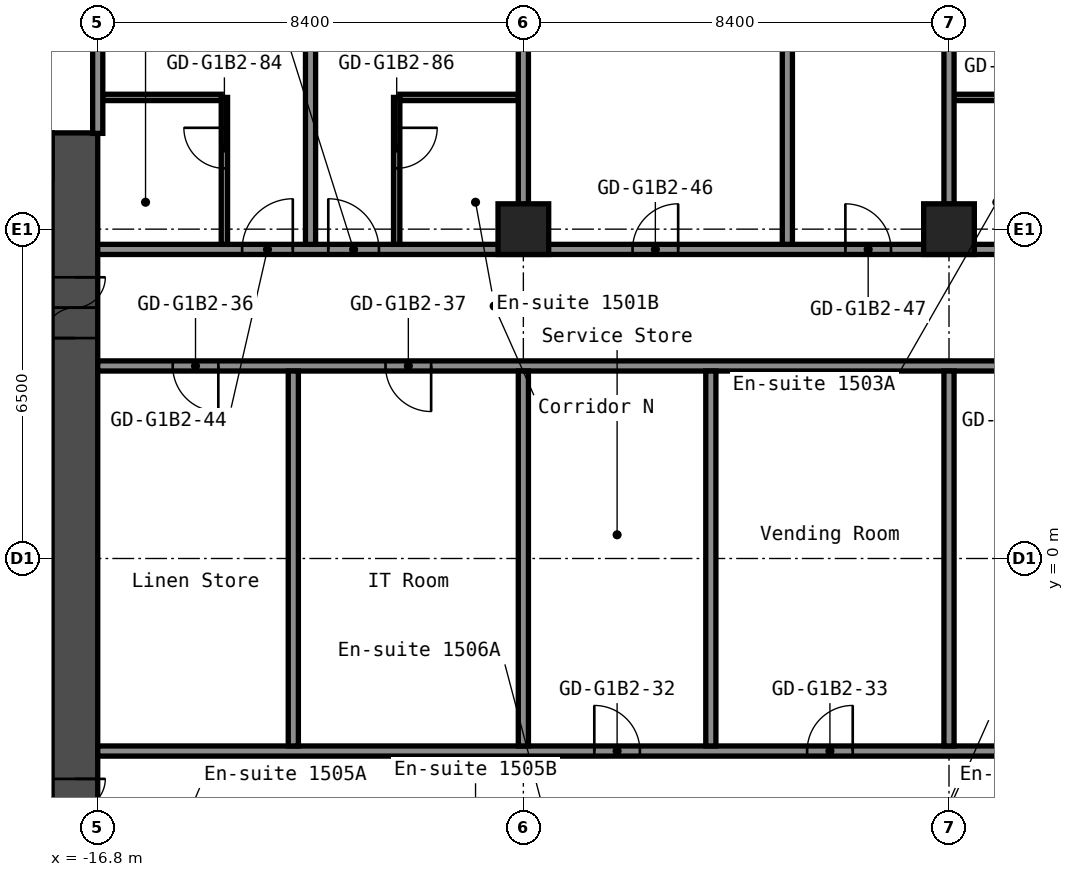
"""IFC4 building model, lengths in metres.
Left out: names, types, materials, properties, quantities, classifications, styles, units other than length and angle.
Written with IfcOpenShell. Run it as: python <this file> out.ifc"""

import sys

from ifc_helpers import new_model, si_unit, direction, frame, frame_2d, origin, origin_2d, place, context, subcontext, project, spatial, rectangle, hollow_rectangle, extrude, element, fill, save


model = new_model("IFC4")
c1 = context("Model", 3, precision=1e-05, world=origin(), true_north=direction((0.0, 1.0)))
c2 = subcontext(c1, "Body", "Model", "MODEL_VIEW")
j1 = project(units=[si_unit("LENGTHUNIT", "METRE"), si_unit("PLANEANGLEUNIT", "RADIAN")], contexts=[c1])
p1 = place(None, origin())
s1 = spatial("IfcSite", under=j1, at=p1, CompositionType="ELEMENT")
p2 = place(p1, origin())
s2 = spatial("IfcBuilding", under=s1, at=p2, CompositionType="ELEMENT")
p3 = place(p2, frame((0.0, 0.0, 55.0)))
s3 = spatial("IfcBuildingStorey", under=s2, at=p3, CompositionType="ELEMENT", Elevation=55.0)
for number, where, z_axis, x_axis in (
    (1, (-8.4, 6.5, 0.0), (0.0, 0.0, 1.0), (1.0, 0.0, 0.0)),
    (2, (0.0, 6.5, 0.0), (0.0, 0.0, 1.0), (1.0, 0.0, 0.0)),
):
    element("IfcColumn", number, at=place(p3, frame(where, z_axis=z_axis, x_axis=x_axis)), inside=s3, PredefinedType="COLUMN", context=c2, shape_type="SweptSolid", body=[
        extrude(hollow_rectangle(XDim=1.0, YDim=1.0, WallThickness=0.04, at=origin_2d()), origin(), (0.0, 0.0, 1.0), 2.8),
    ])
p4 = place(p3, frame((-17.25, -8.4, 0.0), z_axis=(0.0, 0.0, 1.0), x_axis=(0.0, 1.0, 0.0)))
e3 = element("IfcWall", 3, at=p4, inside=s3, PredefinedType="SHEAR", context=c2, shape_type="SweptSolid", body=[
    extrude(rectangle(XDim=16.8, YDim=0.9, at=frame_2d((8.4, 0.0))), origin(), (0.0, 0.0, 1.0), 2.8),
])
p5 = place(p4, frame((12.75, 0.0, 0.0)))
e4 = element("IfcOpeningElement", 4, at=p5, cuts=e3, PredefinedType="OPENING", context=c2, shape_type="SweptSolid", body=[
    extrude(rectangle(XDim=1.2, YDim=2.1, at=frame_2d((0.6, 1.05))), frame((0.0, 0.46, 0.0), z_axis=(0.0, -1.0, 0.0), x_axis=(1.0, 0.0, 0.0)), (0.0, 0.0, 1.0), 0.92),
])
p6 = place(p4, frame((2.85, 0.0, 0.0)))
e5 = element("IfcOpeningElement", 5, at=p6, cuts=e3, PredefinedType="OPENING", context=c2, shape_type="SweptSolid", body=[
    extrude(rectangle(XDim=1.2, YDim=2.1, at=frame_2d((0.6, 1.05))), frame((0.0, 0.46, 0.0), z_axis=(0.0, -1.0, 0.0), x_axis=(1.0, 0.0, 0.0)), (0.0, 0.0, 1.0), 0.92),
])
p7 = place(p3, frame((-32.7, 7.95, 0.0), z_axis=(0.0, 0.0, 1.0), x_axis=(1.0, 0.0, 0.0)))
e6 = element("IfcWall", 6, at=p7, inside=s3, PredefinedType="SHEAR", context=c2, shape_type="SweptSolid", body=[
    extrude(rectangle(XDim=15.0, YDim=0.9, at=frame_2d((7.5, 0.0))), origin(), (0.0, 0.0, 1.0), 2.8),
])
p8 = place(p7, frame((3.4, 0.0, 0.0)))
e7 = element("IfcOpeningElement", 7, at=p8, cuts=e6, PredefinedType="OPENING", context=c2, shape_type="SweptSolid", body=[
    extrude(rectangle(XDim=1.2, YDim=2.1, at=frame_2d((0.6, 1.05))), frame((0.0, 0.46, 0.0), z_axis=(0.0, -1.0, 0.0), x_axis=(1.0, 0.0, 0.0)), (0.0, 0.0, 1.0), 0.92),
])
p9 = place(p7, frame((0.75, 0.0, 0.0)))
e8 = element("IfcOpeningElement", 8, at=p9, cuts=e6, PredefinedType="OPENING", context=c2, shape_type="SweptSolid", body=[
    extrude(rectangle(XDim=0.9, YDim=2.1, at=frame_2d((0.45, 1.05))), frame((0.0, 0.46, 0.0), z_axis=(0.0, -1.0, 0.0), x_axis=(1.0, 0.0, 0.0)), (0.0, 0.0, 1.0), 0.92),
])
p10 = place(p3, frame((-16.8, -3.8, 0.0), z_axis=(0.0, 0.0, 1.0), x_axis=(1.0, 0.0, 0.0)))
e9 = element("IfcWall", 9, at=p10, inside=s3, PredefinedType="PARTITIONING", context=c2, shape_type="SweptSolid", body=[
    extrude(rectangle(XDim=33.6, YDim=0.2, at=frame_2d((16.8, 0.0))), origin(), (0.0, 0.0, 1.0), 2.8),
])
p11 = place(p10, frame((9.8, 0.0, 0.0)))
e10 = element("IfcOpeningElement", 10, at=p11, cuts=e9, PredefinedType="OPENING", context=c2, shape_type="SweptSolid", body=[
    extrude(rectangle(XDim=0.9, YDim=2.1, at=frame_2d((0.45, 1.05))), frame((0.0, 0.11, 0.0), z_axis=(0.0, -1.0, 0.0), x_axis=(1.0, 0.0, 0.0)), (0.0, 0.0, 1.0), 0.22),
])
p12 = place(p10, frame((14.0, 0.0, 0.0)))
e11 = element("IfcOpeningElement", 11, at=p12, cuts=e9, PredefinedType="OPENING", context=c2, shape_type="SweptSolid", body=[
    extrude(rectangle(XDim=0.9, YDim=2.1, at=frame_2d((0.45, 1.05))), frame((0.0, 0.11, 0.0), z_axis=(0.0, -1.0, 0.0), x_axis=(1.0, 0.0, 0.0)), (0.0, 0.0, 1.0), 0.22),
])
p13 = place(p10, frame((26.43, 0.0, 0.0)))
e12 = element("IfcOpeningElement", 12, at=p13, cuts=e9, PredefinedType="OPENING", context=c2, shape_type="SweptSolid", body=[
    extrude(rectangle(XDim=0.9, YDim=2.1, at=frame_2d((0.45, 1.05))), frame((0.0, 0.11, 0.0), z_axis=(0.0, -1.0, 0.0), x_axis=(1.0, 0.0, 0.0)), (0.0, 0.0, 1.0), 0.22),
])
p14 = place(p10, frame((30.63, 0.0, 0.0)))
e13 = element("IfcOpeningElement", 13, at=p14, cuts=e9, PredefinedType="OPENING", context=c2, shape_type="SweptSolid", body=[
    extrude(rectangle(XDim=0.9, YDim=2.1, at=frame_2d((0.45, 1.05))), frame((0.0, 0.11, 0.0), z_axis=(0.0, -1.0, 0.0), x_axis=(1.0, 0.0, 0.0)), (0.0, 0.0, 1.0), 0.22),
])
p15 = place(p3, frame((-16.8, 3.8, 0.0), z_axis=(0.0, 0.0, 1.0), x_axis=(1.0, 0.0, 0.0)))
e14 = element("IfcWall", 14, at=p15, inside=s3, PredefinedType="PARTITIONING", context=c2, shape_type="SweptSolid", body=[
    extrude(rectangle(XDim=33.6, YDim=0.2, at=frame_2d((16.8, 0.0))), origin(), (0.0, 0.0, 1.0), 2.8),
])
p16 = place(p15, frame((1.48, 0.0, 0.0)))
e15 = element("IfcOpeningElement", 15, at=p16, cuts=e14, PredefinedType="OPENING", context=c2, shape_type="SweptSolid", body=[
    extrude(rectangle(XDim=0.9, YDim=2.1, at=frame_2d((0.45, 1.05))), frame((0.0, 0.11, 0.0), z_axis=(0.0, -1.0, 0.0), x_axis=(1.0, 0.0, 0.0)), (0.0, 0.0, 1.0), 0.22),
])
p17 = place(p15, frame((5.68, 0.0, 0.0)))
e16 = element("IfcOpeningElement", 16, at=p17, cuts=e14, PredefinedType="OPENING", context=c2, shape_type="SweptSolid", body=[
    extrude(rectangle(XDim=0.9, YDim=2.1, at=frame_2d((0.45, 1.05))), frame((0.0, 0.11, 0.0), z_axis=(0.0, -1.0, 0.0), x_axis=(1.0, 0.0, 0.0)), (0.0, 0.0, 1.0), 0.22),
])
p18 = place(p15, frame((18.785, 0.0, 0.0)))
e17 = element("IfcOpeningElement", 17, at=p18, cuts=e14, PredefinedType="OPENING", context=c2, shape_type="SweptSolid", body=[
    extrude(rectangle(XDim=0.9, YDim=2.1, at=frame_2d((0.45, 1.05))), frame((0.0, 0.11, 0.0), z_axis=(0.0, -1.0, 0.0), x_axis=(1.0, 0.0, 0.0)), (0.0, 0.0, 1.0), 0.22),
])
p19 = place(p15, frame((22.985, 0.0, 0.0)))
e18 = element("IfcOpeningElement", 18, at=p19, cuts=e14, PredefinedType="OPENING", context=c2, shape_type="SweptSolid", body=[
    extrude(rectangle(XDim=0.9, YDim=2.1, at=frame_2d((0.45, 1.05))), frame((0.0, 0.11, 0.0), z_axis=(0.0, -1.0, 0.0), x_axis=(1.0, 0.0, 0.0)), (0.0, 0.0, 1.0), 0.22),
])
p20 = place(p3, frame((-16.8, 6.1, 0.0), z_axis=(0.0, 0.0, 1.0), x_axis=(1.0, 0.0, 0.0)))
e19 = element("IfcWall", 19, at=p20, inside=s3, PredefinedType="PARTITIONING", context=c2, shape_type="SweptSolid", body=[
    extrude(rectangle(XDim=33.6, YDim=0.2, at=frame_2d((16.8, 0.0))), origin(), (0.0, 0.0, 1.0), 2.8),
])
p21 = place(p20, frame((2.85, 0.0, 0.0)))
e20 = element("IfcOpeningElement", 20, at=p21, cuts=e19, PredefinedType="OPENING", context=c2, shape_type="SweptSolid", body=[
    extrude(rectangle(XDim=1.0, YDim=2.1, at=frame_2d((0.5, 1.05))), frame((0.0, 0.11, 0.0), z_axis=(0.0, -1.0, 0.0), x_axis=(1.0, 0.0, 0.0)), (0.0, 0.0, 1.0), 0.22),
])
p22 = place(p20, frame((4.55, 0.0, 0.0)))
e21 = element("IfcOpeningElement", 21, at=p22, cuts=e19, PredefinedType="OPENING", context=c2, shape_type="SweptSolid", body=[
    extrude(rectangle(XDim=1.0, YDim=2.1, at=frame_2d((0.5, 1.05))), frame((0.0, 0.11, 0.0), z_axis=(0.0, -1.0, 0.0), x_axis=(1.0, 0.0, 0.0)), (0.0, 0.0, 1.0), 0.22),
])
p23 = place(p20, frame((10.555, 0.0, 0.0)))
e22 = element("IfcOpeningElement", 22, at=p23, cuts=e19, PredefinedType="OPENING", context=c2, shape_type="SweptSolid", body=[
    extrude(rectangle(XDim=0.9, YDim=2.1, at=frame_2d((0.45, 1.05))), frame((0.0, 0.11, 0.0), z_axis=(0.0, -1.0, 0.0), x_axis=(1.0, 0.0, 0.0)), (0.0, 0.0, 1.0), 0.22),
])
p24 = place(p20, frame((14.755, 0.0, 0.0)))
e23 = element("IfcOpeningElement", 23, at=p24, cuts=e19, PredefinedType="OPENING", context=c2, shape_type="SweptSolid", body=[
    extrude(rectangle(XDim=0.9, YDim=2.1, at=frame_2d((0.45, 1.05))), frame((0.0, 0.11, 0.0), z_axis=(0.0, -1.0, 0.0), x_axis=(1.0, 0.0, 0.0)), (0.0, 0.0, 1.0), 0.22),
])
p25 = place(p20, frame((19.65, 0.0, 0.0)))
e24 = element("IfcOpeningElement", 24, at=p25, cuts=e19, PredefinedType="OPENING", context=c2, shape_type="SweptSolid", body=[
    extrude(rectangle(XDim=1.0, YDim=2.1, at=frame_2d((0.5, 1.05))), frame((0.0, 0.11, 0.0), z_axis=(0.0, -1.0, 0.0), x_axis=(1.0, 0.0, 0.0)), (0.0, 0.0, 1.0), 0.22),
])
p26 = place(p20, frame((21.35, 0.0, 0.0)))
e25 = element("IfcOpeningElement", 25, at=p26, cuts=e19, PredefinedType="OPENING", context=c2, shape_type="SweptSolid", body=[
    extrude(rectangle(XDim=1.0, YDim=2.1, at=frame_2d((0.5, 1.05))), frame((0.0, 0.11, 0.0), z_axis=(0.0, -1.0, 0.0), x_axis=(1.0, 0.0, 0.0)), (0.0, 0.0, 1.0), 0.22),
])
p27 = place(p20, frame((28.05, 0.0, 0.0)))
e26 = element("IfcOpeningElement", 26, at=p27, cuts=e19, PredefinedType="OPENING", context=c2, shape_type="SweptSolid", body=[
    extrude(rectangle(XDim=1.0, YDim=2.1, at=frame_2d((0.5, 1.05))), frame((0.0, 0.11, 0.0), z_axis=(0.0, -1.0, 0.0), x_axis=(1.0, 0.0, 0.0)), (0.0, 0.0, 1.0), 0.22),
])
p28 = place(p20, frame((29.75, 0.0, 0.0)))
e27 = element("IfcOpeningElement", 27, at=p28, cuts=e19, PredefinedType="OPENING", context=c2, shape_type="SweptSolid", body=[
    extrude(rectangle(XDim=1.0, YDim=2.1, at=frame_2d((0.5, 1.05))), frame((0.0, 0.11, 0.0), z_axis=(0.0, -1.0, 0.0), x_axis=(1.0, 0.0, 0.0)), (0.0, 0.0, 1.0), 0.22),
])
for number, where, z_axis, x_axis in (
    (28, (-16.7, 9.1, 0.0), (0.0, 0.0, 1.0), (1.0, 0.0, 0.0)),
    (29, (-10.837, 9.1, 0.0), (0.0, 0.0, 1.0), (1.0, 0.0, 0.0)),
    (30, (0.1, 9.1, 0.0), (0.0, 0.0, 1.0), (1.0, 0.0, 0.0)),
):
    element("IfcWall", number, at=place(p3, frame(where, z_axis=z_axis, x_axis=x_axis)), inside=s3, PredefinedType="PARTITIONING", context=c2, shape_type="SweptSolid", body=[
        extrude(rectangle(XDim=2.337, YDim=0.125, at=frame_2d((1.169, 0.0))), origin(), (0.0, 0.0, 1.0), 2.8),
    ])
p29 = place(p3, frame((-16.8, 8.39, 0.0), z_axis=(0.0, 0.0, 1.0), x_axis=(0.0, 1.0, 0.0)))
e31 = element("IfcWall", 31, at=p29, inside=s3, PredefinedType="PARTITIONING", context=c2, shape_type="SweptSolid", body=[
    extrude(rectangle(XDim=11.91, YDim=0.2, at=frame_2d((5.955, 0.0))), origin(), (0.0, 0.0, 1.0), 2.8),
])
p30 = place(p3, frame((-14.3, 6.2, 0.0), z_axis=(0.0, 0.0, 1.0), x_axis=(0.0, 1.0, 0.0)))
e32 = element("IfcWall", 32, at=p30, inside=s3, PredefinedType="PARTITIONING", context=c2, shape_type="SweptSolid", body=[
    extrude(rectangle(XDim=2.9, YDim=0.125, at=frame_2d((1.45, 0.0))), origin(), (0.0, 0.0, 1.0), 2.8),
])
p31 = place(p30, frame((1.5, 0.0, 0.0)))
e33 = element("IfcOpeningElement", 33, at=p31, cuts=e32, PredefinedType="OPENING", context=c2, shape_type="SweptSolid", body=[
    extrude(rectangle(XDim=0.8, YDim=2.1, at=frame_2d((0.4, 1.05))), frame((0.0, 0.073, 0.0), z_axis=(0.0, -1.0, 0.0), x_axis=(1.0, 0.0, 0.0)), (0.0, 0.0, 1.0), 0.145),
])
p32 = place(p3, frame((-12.94, -3.7, 0.0), z_axis=(0.0, 0.0, 1.0), x_axis=(0.0, 1.0, 0.0)))
e34 = element("IfcWall", 34, at=p32, inside=s3, PredefinedType="PARTITIONING", context=c2, shape_type="SweptSolid", body=[
    extrude(rectangle(XDim=7.4, YDim=0.2, at=frame_2d((3.7, 0.0))), origin(), (0.0, 0.0, 1.0), 2.8),
])
p33 = place(p3, frame((-12.6, 6.2, 0.0), z_axis=(0.0, 0.0, 1.0), x_axis=(0.0, 1.0, 0.0)))
e35 = element("IfcWall", 35, at=p33, inside=s3, PredefinedType="PARTITIONING", context=c2, shape_type="SweptSolid", body=[
    extrude(rectangle(XDim=14.1, YDim=0.2, at=frame_2d((7.05, 0.0))), origin(), (0.0, 0.0, 1.0), 2.8),
])
p34 = place(p3, frame((-10.9, 6.2, 0.0), z_axis=(0.0, 0.0, 1.0), x_axis=(0.0, 1.0, 0.0)))
e36 = element("IfcWall", 36, at=p34, inside=s3, PredefinedType="PARTITIONING", context=c2, shape_type="SweptSolid", body=[
    extrude(rectangle(XDim=2.9, YDim=0.125, at=frame_2d((1.45, 0.0))), origin(), (0.0, 0.0, 1.0), 2.8),
])
p35 = place(p34, frame((1.5, 0.0, 0.0)))
e37 = element("IfcOpeningElement", 37, at=p35, cuts=e36, PredefinedType="OPENING", context=c2, shape_type="SweptSolid", body=[
    extrude(rectangle(XDim=0.8, YDim=2.1, at=frame_2d((0.4, 1.05))), frame((0.0, 0.073, 0.0), z_axis=(0.0, -1.0, 0.0), x_axis=(1.0, 0.0, 0.0)), (0.0, 0.0, 1.0), 0.145),
])
p36 = place(p3, frame((-8.4, -3.7, 0.0), z_axis=(0.0, 0.0, 1.0), x_axis=(0.0, 1.0, 0.0)))
e38 = element("IfcWall", 38, at=p36, inside=s3, PredefinedType="PARTITIONING", context=c2, shape_type="SweptSolid", body=[
    extrude(rectangle(XDim=7.4, YDim=0.2, at=frame_2d((3.7, 0.0))), origin(), (0.0, 0.0, 1.0), 2.8),
])
p37 = place(p3, frame((-8.4, 6.99, 0.0), z_axis=(0.0, 0.0, 1.0), x_axis=(0.0, 1.0, 0.0)))
e39 = element("IfcWall", 39, at=p37, inside=s3, PredefinedType="PARTITIONING", context=c2, shape_type="SweptSolid", body=[
    extrude(rectangle(XDim=13.31, YDim=0.2, at=frame_2d((6.655, 0.0))), origin(), (0.0, 0.0, 1.0), 2.8),
])
p38 = place(p3, frame((-4.7, -3.7, 0.0), z_axis=(0.0, 0.0, 1.0), x_axis=(0.0, 1.0, 0.0)))
e40 = element("IfcWall", 40, at=p38, inside=s3, PredefinedType="PARTITIONING", context=c2, shape_type="SweptSolid", body=[
    extrude(rectangle(XDim=7.4, YDim=0.2, at=frame_2d((3.7, 0.0))), origin(), (0.0, 0.0, 1.0), 2.8),
])
p39 = place(p3, frame((-3.19, 6.2, 0.0), z_axis=(0.0, 0.0, 1.0), x_axis=(0.0, 1.0, 0.0)))
e41 = element("IfcWall", 41, at=p39, inside=s3, PredefinedType="PARTITIONING", context=c2, shape_type="SweptSolid", body=[
    extrude(rectangle(XDim=14.1, YDim=0.2, at=frame_2d((7.05, 0.0))), origin(), (0.0, 0.0, 1.0), 2.8),
])
p40 = place(p3, frame((0.0, -3.7, 0.0), z_axis=(0.0, 0.0, 1.0), x_axis=(0.0, 1.0, 0.0)))
e42 = element("IfcWall", 42, at=p40, inside=s3, PredefinedType="PARTITIONING", context=c2, shape_type="SweptSolid", body=[
    extrude(rectangle(XDim=7.4, YDim=0.2, at=frame_2d((3.7, 0.0))), origin(), (0.0, 0.0, 1.0), 2.8),
])
p41 = place(p3, frame((0.0, 6.99, 0.0), z_axis=(0.0, 0.0, 1.0), x_axis=(0.0, 1.0, 0.0)))
e43 = element("IfcWall", 43, at=p41, inside=s3, PredefinedType="PARTITIONING", context=c2, shape_type="SweptSolid", body=[
    extrude(rectangle(XDim=13.31, YDim=0.2, at=frame_2d((6.655, 0.0))), origin(), (0.0, 0.0, 1.0), 2.8),
])
p42 = place(p5, origin())
e44 = element("IfcDoor", 44, at=p42, inside=s3, OperationType="DOUBLE_DOOR_SINGLE_SWING", PredefinedType="DOOR", context=c2, shape_type="SweptSolid", body=[
    extrude(rectangle(XDim=1.2, YDim=2.1, at=frame_2d((0.6, 1.05))), frame((0.0, 0.025, 0.0), z_axis=(0.0, -1.0, 0.0), x_axis=(1.0, 0.0, 0.0)), (0.0, 0.0, 1.0), 0.05),
])
fill(e4, e44)
p43 = place(p6, origin())
e45 = element("IfcDoor", 45, at=p43, inside=s3, OperationType="DOUBLE_DOOR_SINGLE_SWING", PredefinedType="DOOR", context=c2, shape_type="SweptSolid", body=[
    extrude(rectangle(XDim=1.2, YDim=2.1, at=frame_2d((0.6, 1.05))), frame((0.0, 0.025, 0.0), z_axis=(0.0, -1.0, 0.0), x_axis=(1.0, 0.0, 0.0)), (0.0, 0.0, 1.0), 0.05),
])
fill(e5, e45)
p44 = place(p11, origin())
e46 = element("IfcDoor", 46, at=p44, inside=s3, OperationType="SINGLE_SWING_RIGHT", PredefinedType="DOOR", context=c2, shape_type="SweptSolid", body=[
    extrude(rectangle(XDim=0.9, YDim=2.1, at=frame_2d((0.45, 1.05))), frame((0.0, 0.025, 0.0), z_axis=(0.0, -1.0, 0.0), x_axis=(1.0, 0.0, 0.0)), (0.0, 0.0, 1.0), 0.05),
])
fill(e10, e46)
p45 = place(p12, origin())
e47 = element("IfcDoor", 47, at=p45, inside=s3, OperationType="SINGLE_SWING_LEFT", PredefinedType="DOOR", context=c2, shape_type="SweptSolid", body=[
    extrude(rectangle(XDim=0.9, YDim=2.1, at=frame_2d((0.45, 1.05))), frame((0.0, 0.025, 0.0), z_axis=(0.0, -1.0, 0.0), x_axis=(1.0, 0.0, 0.0)), (0.0, 0.0, 1.0), 0.05),
])
fill(e11, e47)
p46 = place(p16, origin())
e48 = element("IfcDoor", 48, at=p46, inside=s3, OperationType="SINGLE_SWING_RIGHT", PredefinedType="DOOR", context=c2, shape_type="SweptSolid", body=[
    extrude(rectangle(XDim=0.9, YDim=2.1, at=frame_2d((0.45, 1.05))), frame((0.0, 0.025, 0.0), z_axis=(0.0, -1.0, 0.0), x_axis=(1.0, 0.0, 0.0)), (0.0, 0.0, 1.0), 0.05),
])
fill(e15, e48)
p47 = place(p17, origin())
e49 = element("IfcDoor", 49, at=p47, inside=s3, OperationType="SINGLE_SWING_RIGHT", PredefinedType="DOOR", context=c2, shape_type="SweptSolid", body=[
    extrude(rectangle(XDim=0.9, YDim=2.1, at=frame_2d((0.45, 1.05))), frame((0.0, 0.025, 0.0), z_axis=(0.0, -1.0, 0.0), x_axis=(1.0, 0.0, 0.0)), (0.0, 0.0, 1.0), 0.05),
])
fill(e16, e49)
p48 = place(p21, origin())
e50 = element("IfcDoor", 50, at=p48, inside=s3, OperationType="SINGLE_SWING_LEFT", PredefinedType="DOOR", context=c2, shape_type="SweptSolid", body=[
    extrude(rectangle(XDim=1.0, YDim=2.1, at=frame_2d((0.5, 1.05))), frame((0.0, 0.025, 0.0), z_axis=(0.0, -1.0, 0.0), x_axis=(1.0, 0.0, 0.0)), (0.0, 0.0, 1.0), 0.05),
])
fill(e20, e50)
p49 = place(p22, origin())
e51 = element("IfcDoor", 51, at=p49, inside=s3, OperationType="SINGLE_SWING_RIGHT", PredefinedType="DOOR", context=c2, shape_type="SweptSolid", body=[
    extrude(rectangle(XDim=1.0, YDim=2.1, at=frame_2d((0.5, 1.05))), frame((0.0, 0.025, 0.0), z_axis=(0.0, -1.0, 0.0), x_axis=(1.0, 0.0, 0.0)), (0.0, 0.0, 1.0), 0.05),
])
fill(e21, e51)
p50 = place(p23, origin())
e52 = element("IfcDoor", 52, at=p50, inside=s3, OperationType="SINGLE_SWING_LEFT", PredefinedType="DOOR", context=c2, shape_type="SweptSolid", body=[
    extrude(rectangle(XDim=0.9, YDim=2.1, at=frame_2d((0.45, 1.05))), frame((0.0, 0.025, 0.0), z_axis=(0.0, -1.0, 0.0), x_axis=(1.0, 0.0, 0.0)), (0.0, 0.0, 1.0), 0.05),
])
fill(e22, e52)
p51 = place(p24, origin())
e53 = element("IfcDoor", 53, at=p51, inside=s3, OperationType="SINGLE_SWING_RIGHT", PredefinedType="DOOR", context=c2, shape_type="SweptSolid", body=[
    extrude(rectangle(XDim=0.9, YDim=2.1, at=frame_2d((0.45, 1.05))), frame((0.0, 0.025, 0.0), z_axis=(0.0, -1.0, 0.0), x_axis=(1.0, 0.0, 0.0)), (0.0, 0.0, 1.0), 0.05),
])
fill(e23, e53)
p52 = place(p31, origin())
e54 = element("IfcDoor", 54, at=p52, inside=s3, OperationType="SINGLE_SWING_LEFT", PredefinedType="DOOR", context=c2, shape_type="SweptSolid", body=[
    extrude(rectangle(XDim=0.8, YDim=2.1, at=frame_2d((0.4, 1.05))), frame((0.0, 0.025, 0.0), z_axis=(0.0, -1.0, 0.0), x_axis=(1.0, 0.0, 0.0)), (0.0, 0.0, 1.0), 0.05),
])
fill(e33, e54)
p53 = place(p35, origin())
e55 = element("IfcDoor", 55, at=p53, inside=s3, OperationType="SINGLE_SWING_RIGHT", PredefinedType="DOOR", context=c2, shape_type="SweptSolid", body=[
    extrude(rectangle(XDim=0.8, YDim=2.1, at=frame_2d((0.4, 1.05))), frame((0.0, 0.025, 0.0), z_axis=(0.0, -1.0, 0.0), x_axis=(1.0, 0.0, 0.0)), (0.0, 0.0, 1.0), 0.05),
])
fill(e37, e55)
save(model, sys.argv[1])
